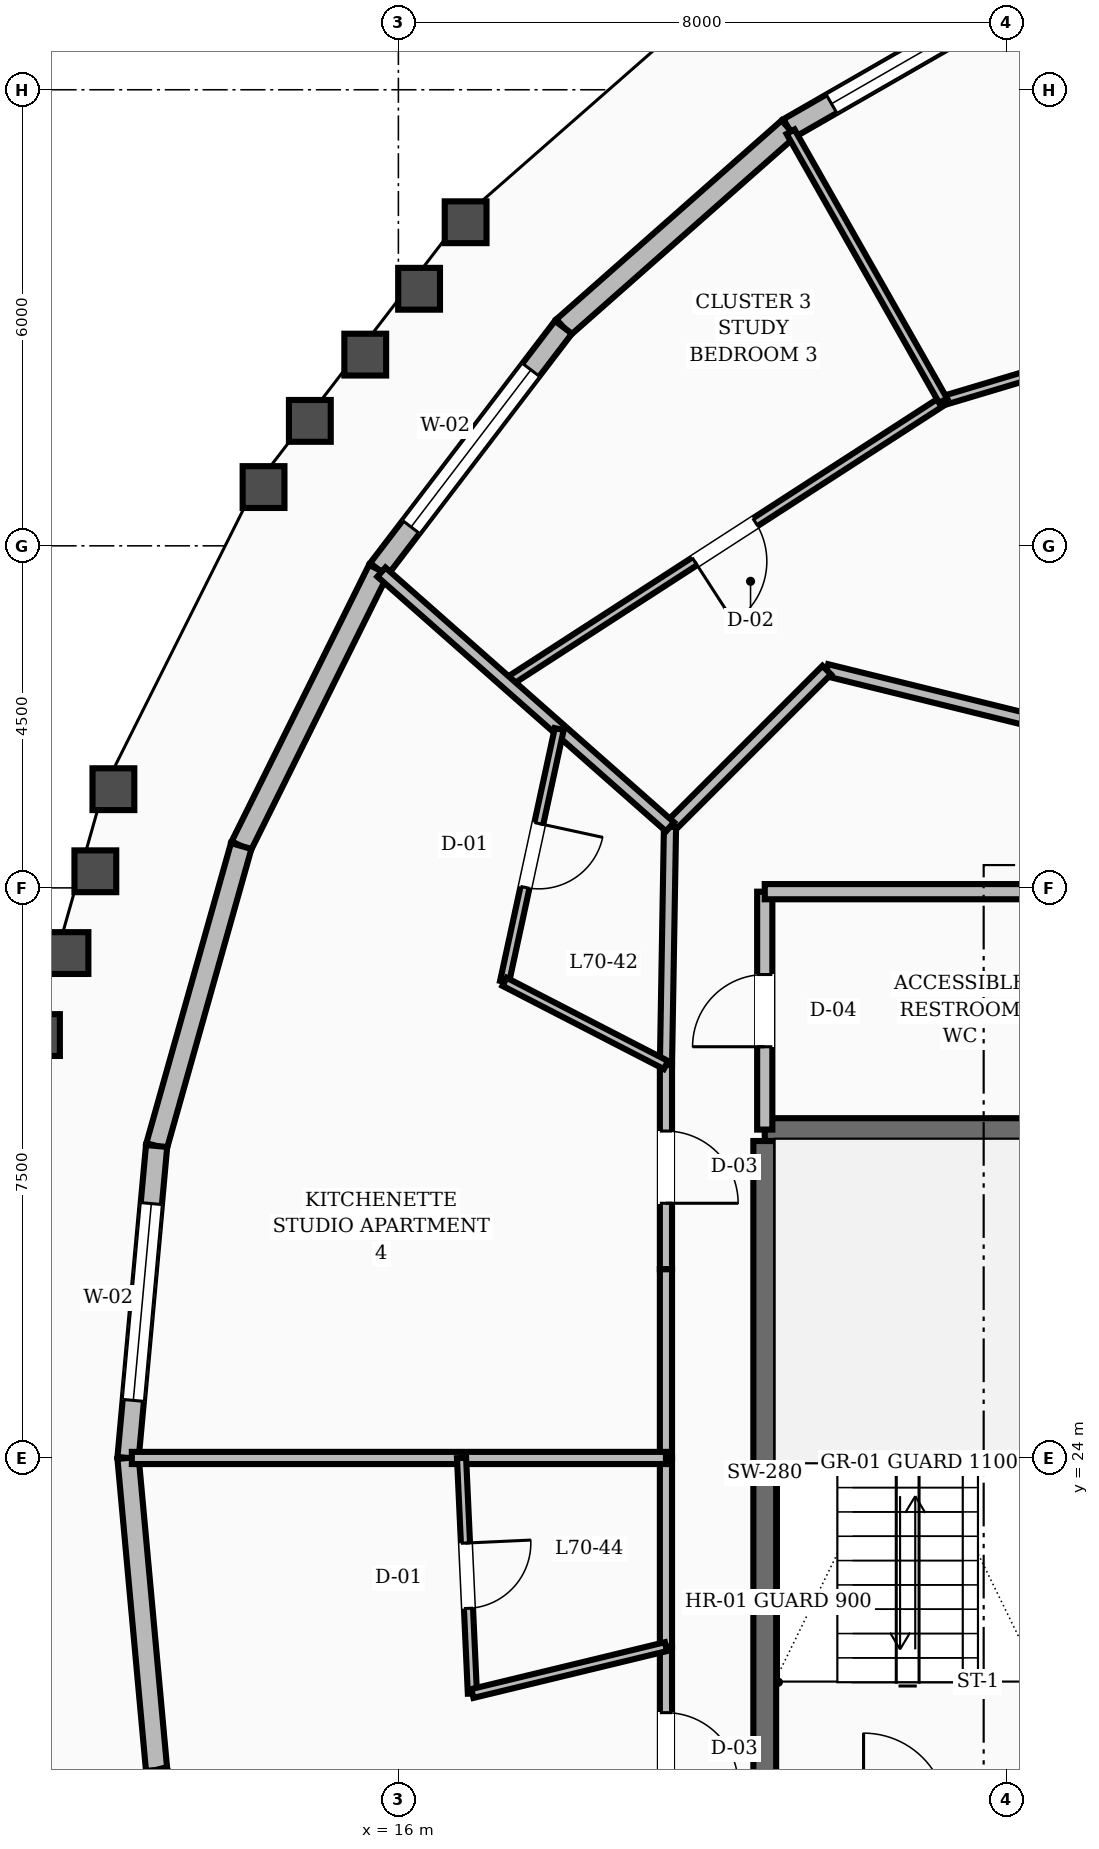
"""IFC4 building model, lengths in metres.
Left out: names, types, materials, properties, quantities, classifications, styles, units other than length and angle.
Written with IfcOpenShell. Run it as: python <this file> out.ifc"""

import sys

from ifc_helpers import new_model, si_unit, direction, frame, frame_2d, origin, place, context, subcontext, project, spatial, rectangle, extrude, element, fill, save


model = new_model("IFC4")
c1 = context("Model", 3, precision=1e-05, world=origin(), true_north=direction((0.0, 1.0)))
c2 = subcontext(c1, "Body", "Model", "MODEL_VIEW")
j1 = project(units=[si_unit("LENGTHUNIT", "METRE"), si_unit("PLANEANGLEUNIT", "RADIAN")], contexts=[c1])
p1 = place(None, origin())
s1 = spatial("IfcSite", under=j1, at=p1, CompositionType="ELEMENT")
p2 = place(p1, origin())
s2 = spatial("IfcBuilding", under=s1, at=p2, CompositionType="ELEMENT")
p3 = place(p2, frame((0.0, 0.0, 268.8)))
s3 = spatial("IfcBuildingStorey", under=s2, at=p3, CompositionType="ELEMENT", Elevation=268.8)
p4 = place(p3, frame((20.82, 19.43, 0.0), z_axis=(0.0, 0.0, 1.0), x_axis=(0.0, 1.0, 0.0)))
e1 = element("IfcWall", 1, at=p4, inside=s3, PredefinedType="SHEAR", context=c2, shape_type="SweptSolid", body=[
    extrude(rectangle(XDim=8.74, YDim=0.3, at=frame_2d((4.37, 0.0))), origin(), (0.0, 0.0, 1.0), 3.6),
])
p5 = place(p3, frame((20.82, 28.32, 0.0), z_axis=(0.0, 0.0, 1.0), x_axis=(1.0, 0.0, 0.0)))
e2 = element("IfcWall", 2, at=p5, inside=s3, PredefinedType="SHEAR", context=c2, shape_type="SweptSolid", body=[
    extrude(rectangle(XDim=3.6, YDim=0.3, at=frame_2d((1.8, 0.0))), origin(), (0.0, 0.0, 1.0), 3.6),
])
p6 = place(p3, frame((24.516, 43.436, 0.0), z_axis=(0.0, 0.0, 1.0), x_axis=(-0.866911036779, -0.498462891608, 0.0)))
e3 = element("IfcWall", 3, at=p6, inside=s3, PredefinedType="STANDARD", context=c2, shape_type="SweptSolid", body=[
    extrude(rectangle(XDim=3.9, YDim=0.28, at=frame_2d((1.95, 0.0))), origin(), (0.0, 0.0, 1.0), 2.88),
])
p7 = place(p6, frame((0.65, 0.0, 0.8)))
e4 = element("IfcOpeningElement", 4, at=p7, cuts=e3, PredefinedType="OPENING", context=c2, shape_type="SweptSolid", body=[
    extrude(rectangle(XDim=2.6, YDim=1.65, at=frame_2d((1.3, 0.825))), frame((0.0, 0.15, 0.0), z_axis=(0.0, -1.0, 0.0), x_axis=(1.0, 0.0, 0.0)), (0.0, 0.0, 1.0), 0.3),
])
p8 = place(p3, frame((21.135, 41.492, 0.0), z_axis=(0.0, 0.0, 1.0), x_axis=(-0.749653985562, -0.661829964515, 0.0)))
e5 = element("IfcWall", 5, at=p8, inside=s3, PredefinedType="STANDARD", context=c2, shape_type="SweptSolid", body=[
    extrude(rectangle(XDim=3.953, YDim=0.28, at=frame_2d((1.977, 0.0))), origin(), (0.0, 0.0, 1.0), 2.88),
])
p9 = place(p3, frame((18.171, 38.875, 0.0), z_axis=(0.0, 0.0, 1.0), x_axis=(-0.606584214855, -0.795019238942, 0.0)))
e6 = element("IfcWall", 6, at=p9, inside=s3, PredefinedType="STANDARD", context=c2, shape_type="SweptSolid", body=[
    extrude(rectangle(XDim=4.01, YDim=0.28, at=frame_2d((2.005, 0.0))), origin(), (0.0, 0.0, 1.0), 2.88),
])
p10 = place(p9, frame((0.705, 0.0, 0.8)))
e7 = element("IfcOpeningElement", 7, at=p10, cuts=e6, PredefinedType="OPENING", context=c2, shape_type="SweptSolid", body=[
    extrude(rectangle(XDim=2.6, YDim=1.65, at=frame_2d((1.3, 0.825))), frame((0.0, 0.15, 0.0), z_axis=(0.0, -1.0, 0.0), x_axis=(1.0, 0.0, 0.0)), (0.0, 0.0, 1.0), 0.3),
])
p11 = place(p3, frame((15.739, 35.688, 0.0), z_axis=(0.0, 0.0, 1.0), x_axis=(-0.444975896213, -0.895542546052, 0.0)))
e8 = element("IfcWall", 8, at=p11, inside=s3, PredefinedType="STANDARD", context=c2, shape_type="SweptSolid", body=[
    extrude(rectangle(XDim=4.061, YDim=0.28, at=frame_2d((2.031, 0.0))), origin(), (0.0, 0.0, 1.0), 2.88),
])
p12 = place(p3, frame((13.932, 32.051, 0.0), z_axis=(0.0, 0.0, 1.0), x_axis=(-0.271385212896, -0.962470813179, 0.0)))
e9 = element("IfcWall", 9, at=p12, inside=s3, PredefinedType="STANDARD", context=c2, shape_type="SweptSolid", body=[
    extrude(rectangle(XDim=4.1, YDim=0.28, at=frame_2d((2.05, 0.0))), origin(), (0.0, 0.0, 1.0), 2.88),
])
p13 = place(p3, frame((12.819, 28.104, 0.0), z_axis=(0.0, 0.0, 1.0), x_axis=(-0.091230098321, -0.995829839461, 0.0)))
e10 = element("IfcWall", 10, at=p13, inside=s3, PredefinedType="STANDARD", context=c2, shape_type="SweptSolid", body=[
    extrude(rectangle(XDim=4.121, YDim=0.28, at=frame_2d((2.061, 0.0))), origin(), (0.0, 0.0, 1.0), 2.88),
])
p14 = place(p13, frame((0.76, 0.0, 0.8)))
e11 = element("IfcOpeningElement", 11, at=p14, cuts=e10, PredefinedType="OPENING", context=c2, shape_type="SweptSolid", body=[
    extrude(rectangle(XDim=2.6, YDim=1.65, at=frame_2d((1.3, 0.825))), frame((0.0, 0.15, 0.0), z_axis=(0.0, -1.0, 0.0), x_axis=(1.0, 0.0, 0.0)), (0.0, 0.0, 1.0), 0.3),
])
p15 = place(p3, frame((12.443, 24.0, 0.0), z_axis=(0.0, 0.0, 1.0), x_axis=(0.091230098321, -0.995829839461, 0.0)))
e12 = element("IfcWall", 12, at=p15, inside=s3, PredefinedType="STANDARD", context=c2, shape_type="SweptSolid", body=[
    extrude(rectangle(XDim=4.121, YDim=0.28, at=frame_2d((2.061, 0.0))), origin(), (0.0, 0.0, 1.0), 2.88),
])
p16 = place(p3, frame((12.819, 19.896, 0.0), z_axis=(0.0, 0.0, 1.0), x_axis=(0.271385212896, -0.962470813179, 0.0)))
e13 = element("IfcWall", 13, at=p16, inside=s3, PredefinedType="STANDARD", context=c2, shape_type="SweptSolid", body=[
    extrude(rectangle(XDim=4.1, YDim=0.28, at=frame_2d((2.05, 0.0))), origin(), (0.0, 0.0, 1.0), 2.88),
])
p17 = place(p3, frame((20.82, 28.32, 0.0), z_axis=(0.0, 0.0, 1.0), x_axis=(0.0, 1.0, 0.0)))
e14 = element("IfcWall", 14, at=p17, inside=s3, PredefinedType="SOLIDWALL", context=c2, shape_type="SweptSolid", body=[
    extrude(rectangle(XDim=3.13, YDim=0.2, at=frame_2d((1.565, 0.0))), origin(), (0.0, 0.0, 1.0), 2.87),
])
p18 = place(p17, frame((1.09, 0.0, 0.0)))
e15 = element("IfcOpeningElement", 15, at=p18, cuts=e14, PredefinedType="OPENING", context=c2, shape_type="SweptSolid", body=[
    extrude(rectangle(XDim=0.95, YDim=2.1, at=frame_2d((0.475, 1.05))), frame((0.0, 0.11, 0.0), z_axis=(0.0, -1.0, 0.0), x_axis=(1.0, 0.0, 0.0)), (0.0, 0.0, 1.0), 0.22),
])
p19 = place(p3, frame((20.82, 31.45, 0.0), z_axis=(0.0, 0.0, 1.0), x_axis=(1.0, 0.0, 0.0)))
e16 = element("IfcWall", 16, at=p19, inside=s3, PredefinedType="SOLIDWALL", context=c2, shape_type="SweptSolid", body=[
    extrude(rectangle(XDim=3.98, YDim=0.2, at=frame_2d((1.99, 0.0))), origin(), (0.0, 0.0, 1.0), 2.87),
])
p20 = place(p3, frame((25.752, 33.35, 0.0), z_axis=(0.0, 0.0, 1.0), x_axis=(-0.970939799552, 0.239323850978, 0.0)))
e17 = element("IfcWall", 17, at=p20, inside=s3, PredefinedType="SOLIDWALL", context=c2, shape_type="SweptSolid", body=[
    extrude(rectangle(XDim=4.241, YDim=0.16, at=frame_2d((2.12, 0.0))), origin(), (0.0, 0.0, 1.0), 2.87),
])
p21 = place(p3, frame((21.635, 34.365, 0.0), z_axis=(0.0, 0.0, 1.0), x_axis=(-0.707106781187, -0.707106781187, 0.0)))
e18 = element("IfcWall", 18, at=p21, inside=s3, PredefinedType="SOLIDWALL", context=c2, shape_type="SweptSolid", body=[
    extrude(rectangle(XDim=2.916, YDim=0.16, at=frame_2d((1.458, 0.0))), origin(), (0.0, 0.0, 1.0), 2.87),
])
p22 = place(p3, frame((19.573, 32.303, 0.0), z_axis=(0.0, 0.0, 1.0), x_axis=(-0.016981035134, -0.999855811828, 0.0)))
e19 = element("IfcWall", 19, at=p22, inside=s3, PredefinedType="SOLIDWALL", context=c2, shape_type="SweptSolid", body=[
    extrude(rectangle(XDim=3.134, YDim=0.16, at=frame_2d((1.567, 0.0))), origin(), (0.0, 0.0, 1.0), 2.87),
])
p23 = place(p3, frame((19.52, 29.169, 0.0), z_axis=(0.0, 0.0, 1.0), x_axis=(0.0, -1.0, 0.0)))
e20 = element("IfcWall", 20, at=p23, inside=s3, PredefinedType="SOLIDWALL", context=c2, shape_type="SweptSolid", body=[
    extrude(rectangle(XDim=2.687, YDim=0.16, at=frame_2d((1.344, 0.0))), origin(), (0.0, 0.0, 1.0), 2.87),
])
p24 = place(p23, frame((0.868, 0.0, 0.0)))
e21 = element("IfcOpeningElement", 21, at=p24, cuts=e20, PredefinedType="OPENING", context=c2, shape_type="SweptSolid", body=[
    extrude(rectangle(XDim=0.95, YDim=2.1, at=frame_2d((0.475, 1.05))), frame((0.0, 0.09, 0.0), z_axis=(0.0, -1.0, 0.0), x_axis=(1.0, 0.0, 0.0)), (0.0, 0.0, 1.0), 0.18),
])
for number, where, z_axis, x_axis in (
    (22, (19.52, 26.482, 0.0), (0.0, 0.0, 1.0), (0.0, -1.0, 0.0)),
    (23, (19.52, 24.0, 0.0), (0.0, 0.0, 1.0), (0.0, -1.0, 0.0)),
):
    element("IfcWall", number, at=place(p3, frame(where, z_axis=z_axis, x_axis=x_axis)), inside=s3, PredefinedType="SOLIDWALL", context=c2, shape_type="SweptSolid", body=[
        extrude(rectangle(XDim=2.482, YDim=0.16, at=frame_2d((1.241, 0.0))), origin(), (0.0, 0.0, 1.0), 2.87),
    ])
p25 = place(p3, frame((19.52, 21.518, 0.0), z_axis=(0.0, 0.0, 1.0), x_axis=(0.0, -1.0, 0.0)))
e24 = element("IfcWall", 24, at=p25, inside=s3, PredefinedType="SOLIDWALL", context=c2, shape_type="SweptSolid", body=[
    extrude(rectangle(XDim=2.687, YDim=0.16, at=frame_2d((1.344, 0.0))), origin(), (0.0, 0.0, 1.0), 2.87),
])
p26 = place(p25, frame((0.868, 0.0, 0.0)))
e25 = element("IfcOpeningElement", 25, at=p26, cuts=e24, PredefinedType="OPENING", context=c2, shape_type="SweptSolid", body=[
    extrude(rectangle(XDim=0.95, YDim=2.1, at=frame_2d((0.475, 1.05))), frame((0.0, 0.09, 0.0), z_axis=(0.0, -1.0, 0.0), x_axis=(1.0, 0.0, 0.0)), (0.0, 0.0, 1.0), 0.18),
])
p27 = place(p3, frame((29.045, 39.668, 0.0), z_axis=(0.0, 0.0, 1.0), x_axis=(-0.958019889786, -0.28670174533, 0.0)))
e26 = element("IfcWall", 26, at=p27, inside=s3, PredefinedType="PARTITIONING", context=c2, shape_type="SweptSolid", body=[
    extrude(rectangle(XDim=6.136, YDim=0.12, at=frame_2d((3.068, 0.0))), origin(), (0.0, 0.0, 1.0), 2.87),
])
p28 = place(p27, frame((2.593, 0.0, 0.0)))
e27 = element("IfcOpeningElement", 27, at=p28, cuts=e26, PredefinedType="OPENING", context=c2, shape_type="SweptSolid", body=[
    extrude(rectangle(XDim=0.95, YDim=2.1, at=frame_2d((0.475, 1.05))), frame((0.0, 0.07, 0.0), z_axis=(0.0, -1.0, 0.0), x_axis=(1.0, 0.0, 0.0)), (0.0, 0.0, 1.0), 0.14),
])
p29 = place(p3, frame((23.167, 37.909, 0.0), z_axis=(0.0, 0.0, 1.0), x_axis=(-0.83981921831, -0.542866171866, 0.0)))
e28 = element("IfcWall", 28, at=p29, inside=s3, PredefinedType="PARTITIONING", context=c2, shape_type="SweptSolid", body=[
    extrude(rectangle(XDim=6.835, YDim=0.12, at=frame_2d((3.418, 0.0))), origin(), (0.0, 0.0, 1.0), 2.87),
])
p30 = place(p29, frame((2.943, 0.0, 0.0)))
e29 = element("IfcOpeningElement", 29, at=p30, cuts=e28, PredefinedType="OPENING", context=c2, shape_type="SweptSolid", body=[
    extrude(rectangle(XDim=0.95, YDim=2.1, at=frame_2d((0.475, 1.05))), frame((0.0, 0.07, 0.0), z_axis=(0.0, -1.0, 0.0), x_axis=(1.0, 0.0, 0.0)), (0.0, 0.0, 1.0), 0.14),
])
p31 = place(p3, frame((23.167, 37.909, 0.0), z_axis=(0.0, 0.0, 1.0), x_axis=(-0.493338072586, 0.869837655047, 0.0)))
e30 = element("IfcWall", 30, at=p31, inside=s3, PredefinedType="PARTITIONING", context=c2, shape_type="SweptSolid", body=[
    extrude(rectangle(XDim=4.068, YDim=0.12, at=frame_2d((2.034, 0.0))), origin(), (0.0, 0.0, 1.0), 2.87),
])
p32 = place(p3, frame((19.573, 32.303, 0.0), z_axis=(0.0, 0.0, 1.0), x_axis=(-0.749729511221, 0.661744406856, 0.0)))
e31 = element("IfcWall", 31, at=p32, inside=s3, PredefinedType="SOLIDWALL", context=c2, shape_type="SweptSolid", body=[
    extrude(rectangle(XDim=5.064, YDim=0.16, at=frame_2d((2.532, 0.0))), origin(), (0.0, 0.0, 1.0), 2.87),
])
p33 = place(p3, frame((18.116, 33.589, 0.0), z_axis=(0.0, 0.0, 1.0), x_axis=(-0.211547716105, -0.977367670742, 0.0)))
e32 = element("IfcWall", 32, at=p33, inside=s3, PredefinedType="PARTITIONING", context=c2, shape_type="SweptSolid", body=[
    extrude(rectangle(XDim=3.402, YDim=0.12, at=frame_2d((1.701, 0.0))), origin(), (0.0, 0.0, 1.0), 2.87),
])
p34 = place(p33, frame((1.271, 0.0, 0.0)))
e33 = element("IfcOpeningElement", 33, at=p34, cuts=e32, PredefinedType="OPENING", context=c2, shape_type="SweptSolid", body=[
    extrude(rectangle(XDim=0.86, YDim=2.1, at=frame_2d((0.43, 1.05))), frame((0.0, 0.07, 0.0), z_axis=(0.0, -1.0, 0.0), x_axis=(1.0, 0.0, 0.0)), (0.0, 0.0, 1.0), 0.14),
])
p35 = place(p3, frame((19.52, 29.169, 0.0), z_axis=(0.0, 0.0, 1.0), x_axis=(-0.888840886665, 0.458215973305, 0.0)))
e34 = element("IfcWall", 34, at=p35, inside=s3, PredefinedType="PARTITIONING", context=c2, shape_type="SweptSolid", body=[
    extrude(rectangle(XDim=2.389, YDim=0.12, at=frame_2d((1.195, 0.0))), origin(), (0.0, 0.0, 1.0), 2.87),
])
p36 = place(p3, frame((19.52, 24.0, 0.0), z_axis=(0.0, 0.0, 1.0), x_axis=(-1.0, 0.0, 0.0)))
e35 = element("IfcWall", 35, at=p36, inside=s3, PredefinedType="SOLIDWALL", context=c2, shape_type="SweptSolid", body=[
    extrude(rectangle(XDim=7.027, YDim=0.16, at=frame_2d((3.513, 0.0))), origin(), (0.0, 0.0, 1.0), 2.87),
])
p37 = place(p3, frame((16.831, 24.0, 0.0), z_axis=(0.0, 0.0, 1.0), x_axis=(0.046043143671, -0.99893945208, 0.0)))
e36 = element("IfcWall", 36, at=p37, inside=s3, PredefinedType="PARTITIONING", context=c2, shape_type="SweptSolid", body=[
    extrude(rectangle(XDim=3.102, YDim=0.12, at=frame_2d((1.551, 0.0))), origin(), (0.0, 0.0, 1.0), 2.87),
])
p38 = place(p37, frame((1.121, 0.0, 0.0)))
e37 = element("IfcOpeningElement", 37, at=p38, cuts=e36, PredefinedType="OPENING", context=c2, shape_type="SweptSolid", body=[
    extrude(rectangle(XDim=0.86, YDim=2.1, at=frame_2d((0.43, 1.05))), frame((0.0, 0.07, 0.0), z_axis=(0.0, -1.0, 0.0), x_axis=(1.0, 0.0, 0.0)), (0.0, 0.0, 1.0), 0.14),
])
p39 = place(p3, frame((19.52, 21.518, 0.0), z_axis=(0.0, 0.0, 1.0), x_axis=(-0.971945718509, -0.235205272629, 0.0)))
e38 = element("IfcWall", 38, at=p39, inside=s3, PredefinedType="PARTITIONING", context=c2, shape_type="SweptSolid", body=[
    extrude(rectangle(XDim=2.62, YDim=0.12, at=frame_2d((1.31, 0.0))), origin(), (0.0, 0.0, 1.0), 2.87),
])
p40 = place(p7, origin())
e39 = element("IfcWindow", 39, at=p40, inside=s3, PartitioningType="SINGLE_PANEL", PredefinedType="WINDOW", context=c2, shape_type="SweptSolid", body=[
    extrude(rectangle(XDim=2.6, YDim=1.65, at=frame_2d((1.3, 0.825))), frame((0.0, 0.03, 0.0), z_axis=(0.0, -1.0, 0.0), x_axis=(1.0, 0.0, 0.0)), (0.0, 0.0, 1.0), 0.06),
])
fill(e4, e39)
p41 = place(p10, origin())
e40 = element("IfcWindow", 40, at=p41, inside=s3, PartitioningType="SINGLE_PANEL", PredefinedType="WINDOW", context=c2, shape_type="SweptSolid", body=[
    extrude(rectangle(XDim=2.6, YDim=1.65, at=frame_2d((1.3, 0.825))), frame((0.0, 0.03, 0.0), z_axis=(0.0, -1.0, 0.0), x_axis=(1.0, 0.0, 0.0)), (0.0, 0.0, 1.0), 0.06),
])
fill(e7, e40)
p42 = place(p14, origin())
e41 = element("IfcWindow", 41, at=p42, inside=s3, PartitioningType="SINGLE_PANEL", PredefinedType="WINDOW", context=c2, shape_type="SweptSolid", body=[
    extrude(rectangle(XDim=2.6, YDim=1.65, at=frame_2d((1.3, 0.825))), frame((0.0, 0.03, 0.0), z_axis=(0.0, -1.0, 0.0), x_axis=(1.0, 0.0, 0.0)), (0.0, 0.0, 1.0), 0.06),
])
fill(e11, e41)
p43 = place(p18, origin())
e42 = element("IfcDoor", 42, at=p43, inside=s3, OperationType="SINGLE_SWING_LEFT", PredefinedType="DOOR", context=c2, shape_type="SweptSolid", body=[
    extrude(rectangle(XDim=0.95, YDim=2.1, at=frame_2d((0.475, 1.05))), frame((0.0, 0.025, 0.0), z_axis=(0.0, -1.0, 0.0), x_axis=(1.0, 0.0, 0.0)), (0.0, 0.0, 1.0), 0.05),
])
fill(e15, e42)
p44 = place(p30, origin())
e43 = element("IfcDoor", 43, at=p44, inside=s3, OperationType="SINGLE_SWING_RIGHT", PredefinedType="DOOR", context=c2, shape_type="SweptSolid", body=[
    extrude(rectangle(XDim=0.95, YDim=2.1, at=frame_2d((0.475, 1.05))), frame((0.0, 0.025, 0.0), z_axis=(0.0, -1.0, 0.0), x_axis=(1.0, 0.0, 0.0)), (0.0, 0.0, 1.0), 0.05),
])
fill(e29, e43)
p45 = place(p34, origin())
e44 = element("IfcDoor", 44, at=p45, inside=s3, OperationType="SINGLE_SWING_LEFT", PredefinedType="DOOR", context=c2, shape_type="SweptSolid", body=[
    extrude(rectangle(XDim=0.86, YDim=2.1, at=frame_2d((0.43, 1.05))), frame((0.0, 0.025, 0.0), z_axis=(0.0, -1.0, 0.0), x_axis=(1.0, 0.0, 0.0)), (0.0, 0.0, 1.0), 0.05),
])
fill(e33, e44)
p46 = place(p24, origin())
e45 = element("IfcDoor", 45, at=p46, inside=s3, OperationType="SINGLE_SWING_RIGHT", PredefinedType="DOOR", context=c2, shape_type="SweptSolid", body=[
    extrude(rectangle(XDim=0.95, YDim=2.1, at=frame_2d((0.475, 1.05))), frame((0.0, 0.025, 0.0), z_axis=(0.0, -1.0, 0.0), x_axis=(1.0, 0.0, 0.0)), (0.0, 0.0, 1.0), 0.05),
])
fill(e21, e45)
p47 = place(p38, origin())
e46 = element("IfcDoor", 46, at=p47, inside=s3, OperationType="SINGLE_SWING_LEFT", PredefinedType="DOOR", context=c2, shape_type="SweptSolid", body=[
    extrude(rectangle(XDim=0.86, YDim=2.1, at=frame_2d((0.43, 1.05))), frame((0.0, 0.025, 0.0), z_axis=(0.0, -1.0, 0.0), x_axis=(1.0, 0.0, 0.0)), (0.0, 0.0, 1.0), 0.05),
])
fill(e37, e46)
p48 = place(p26, origin())
e47 = element("IfcDoor", 47, at=p48, inside=s3, OperationType="SINGLE_SWING_RIGHT", PredefinedType="DOOR", context=c2, shape_type="SweptSolid", body=[
    extrude(rectangle(XDim=0.95, YDim=2.1, at=frame_2d((0.475, 1.05))), frame((0.0, 0.025, 0.0), z_axis=(0.0, -1.0, 0.0), x_axis=(1.0, 0.0, 0.0)), (0.0, 0.0, 1.0), 0.05),
])
fill(e25, e47)
save(model, sys.argv[1])
